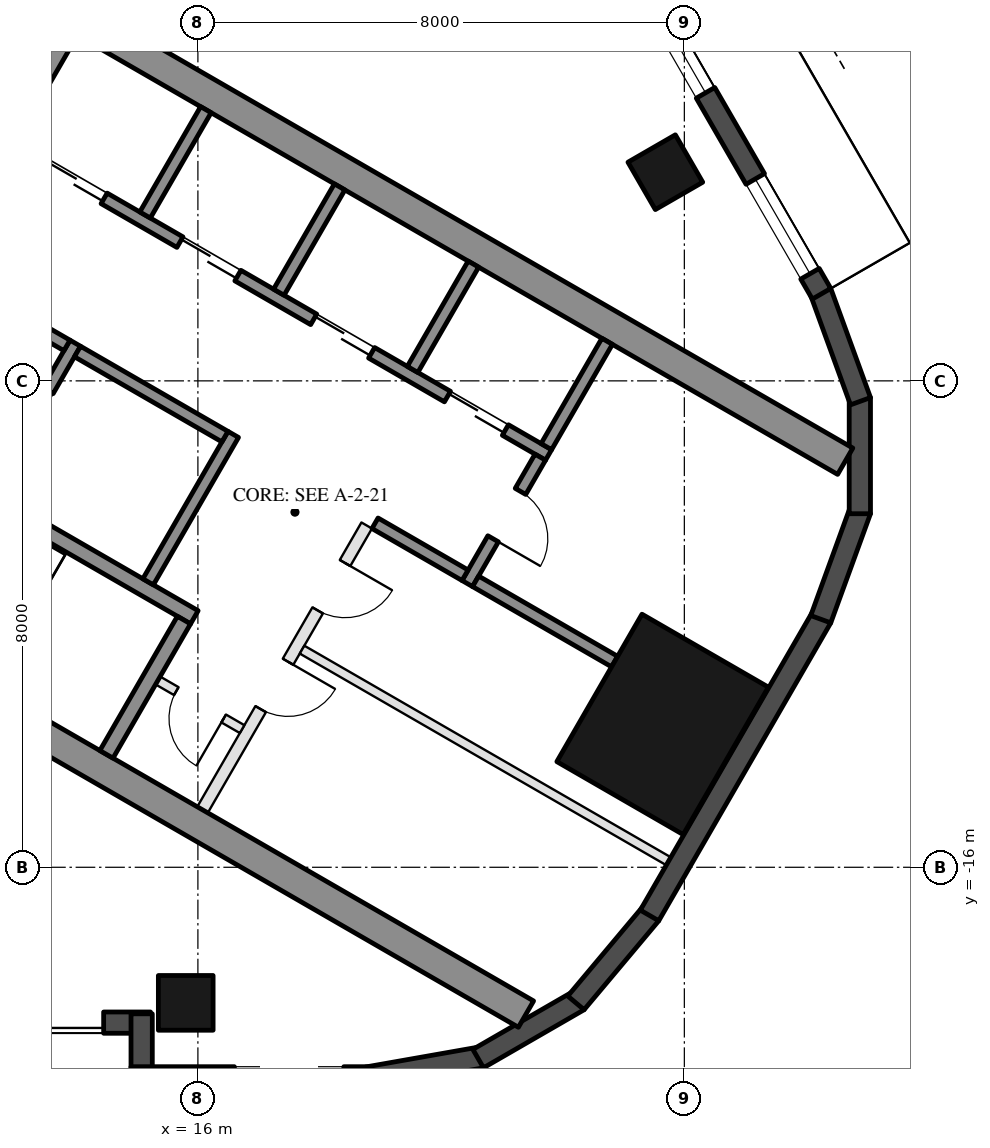
"""IFC4 building model, lengths in metres.
Left out: names, types, materials, properties, quantities, classifications, styles, units other than length and angle.
Written with IfcOpenShell. Run it as: python <this file> out.ifc"""

import sys

from ifc_helpers import new_model, si_unit, direction, frame, frame_2d, origin, origin_2d, place, context, subcontext, project, spatial, rectangle, hollow_rectangle, extrude, element, fill, save


model = new_model("IFC4")
c1 = context("Model", 3, precision=1e-05, world=origin(), true_north=direction((0.0, 1.0)))
c2 = subcontext(c1, "Body", "Model", "MODEL_VIEW")
j1 = project(units=[si_unit("LENGTHUNIT", "METRE"), si_unit("PLANEANGLEUNIT", "RADIAN")], contexts=[c1])
p1 = place(None, origin())
s1 = spatial("IfcSite", under=j1, at=p1, CompositionType="ELEMENT")
p2 = place(p1, origin())
s2 = spatial("IfcBuilding", under=s1, at=p2, CompositionType="ELEMENT")
p3 = place(p2, frame((0.0, 0.0, 98.3)))
s3 = spatial("IfcBuildingStorey", under=s2, at=p3, CompositionType="ELEMENT", Elevation=98.3)
for number, where, z_axis, x_axis in (
    (1, (15.8, -18.23, 0.0), (0.0, 0.0, 1.0), (-1.0, 0.0, 0.0)),
    (2, (23.688, -4.568, 0.0), (0.0, 0.0, 1.0), (-0.5, 0.866, 0.0)),
):
    element("IfcColumn", number, at=place(p3, frame(where, z_axis=z_axis, x_axis=x_axis)), inside=s3, PredefinedType="COLUMN", context=c2, shape_type="SweptSolid", body=[
        extrude(hollow_rectangle(XDim=0.9, YDim=0.9, WallThickness=0.04, at=origin_2d()), origin(), (0.0, 0.0, 1.0), 3.7),
    ])
p4 = place(p3, frame((23.643, -13.65, 0.0), z_axis=(0.0, 0.0, 1.0), x_axis=(0.5, 0.866025403784, 0.0)))
e3 = element("IfcColumn", 3, at=p4, inside=s3, PredefinedType="COLUMN", context=c2, shape_type="SweptSolid", body=[
    extrude(hollow_rectangle(XDim=2.8, YDim=2.4, WallThickness=0.07, at=origin_2d()), origin(), (0.0, 0.0, 1.0), 3.7),
])
p5 = place(p3, frame((8.48, -18.555, 0.0), z_axis=(0.0, 0.0, 1.0), x_axis=(1.0, 0.0, 0.0)))
e4 = element("IfcWall", 4, at=p5, inside=s3, PredefinedType="SOLIDWALL", context=c2, shape_type="SweptSolid", body=[
    extrude(rectangle(XDim=6.74, YDim=0.35, at=frame_2d((3.37, 0.0))), origin(), (0.0, 0.0, 1.0), 3.55),
])
p6 = place(p5, frame((3.57, 0.0, 0.0)))
e5 = element("IfcOpeningElement", 5, at=p6, cuts=e4, PredefinedType="OPENING", context=c2, shape_type="SweptSolid", body=[
    extrude(rectangle(XDim=2.4, YDim=2.4, at=frame_2d((1.2, 1.2))), frame((0.0, 0.185, 0.0), z_axis=(0.0, -1.0, 0.0), x_axis=(1.0, 0.0, 0.0)), (0.0, 0.0, 1.0), 0.37),
])
p7 = place(p5, frame((0.32, 0.0, 0.3)))
e6 = element("IfcOpeningElement", 6, at=p7, cuts=e4, PredefinedType="OPENING", context=c2, shape_type="SweptSolid", body=[
    extrude(rectangle(XDim=2.9, YDim=2.65, at=frame_2d((1.45, 1.325))), frame((0.0, 0.185, 0.0), z_axis=(0.0, -1.0, 0.0), x_axis=(1.0, 0.0, 0.0)), (0.0, 0.0, 1.0), 0.37),
])
p8 = place(p3, frame((15.075, -18.41, 0.0), z_axis=(0.0, 0.0, 1.0), x_axis=(0.0, -1.0, 0.0)))
e7 = element("IfcWall", 7, at=p8, inside=s3, PredefinedType="SOLIDWALL", context=c2, shape_type="SweptSolid", body=[
    extrude(rectangle(XDim=1.22, YDim=0.35, at=frame_2d((0.61, 0.0))), origin(), (0.0, 0.0, 1.0), 3.55),
])
p9 = place(p3, frame((14.9, -19.455, 0.0), z_axis=(0.0, 0.0, 1.0), x_axis=(1.0, 0.0, 0.0)))
e8 = element("IfcWall", 8, at=p9, inside=s3, PredefinedType="SOLIDWALL", context=c2, shape_type="SweptSolid", body=[
    extrude(rectangle(XDim=3.916, YDim=0.35, at=frame_2d((1.958, 0.0))), origin(), (0.0, 0.0, 1.0), 3.55),
])
p10 = place(p9, frame((1.7, 0.0, 0.3)))
e9 = element("IfcOpeningElement", 9, at=p10, cuts=e8, PredefinedType="OPENING", context=c2, shape_type="SweptSolid", body=[
    extrude(rectangle(XDim=1.8, YDim=2.65, at=frame_2d((0.9, 1.325))), frame((0.0, 0.185, 0.0), z_axis=(0.0, -1.0, 0.0), x_axis=(1.0, 0.0, 0.0)), (0.0, 0.0, 1.0), 0.37),
])
p11 = place(p3, frame((18.785, -19.458, 0.0), z_axis=(0.0, 0.0, 1.0), x_axis=(0.984798995425, 0.173697837091, 0.0)))
e10 = element("IfcWall", 10, at=p11, inside=s3, PredefinedType="SOLIDWALL", context=c2, shape_type="SweptSolid", body=[
    extrude(rectangle(XDim=1.91, YDim=0.35, at=frame_2d((0.955, 0.0))), origin(), (0.0, 0.0, 1.0), 3.55),
])
for number, where, z_axis, x_axis in (
    (11, (20.61, -19.147, 0.0), (0.0, 0.0, 1.0), (0.866, 0.5, 0.0)),
    (12, (22.217, -18.231, 0.0), (0.0, 0.0, 1.0), (0.643, 0.766, 0.0)),
):
    element("IfcWall", number, at=place(p3, frame(where, z_axis=z_axis, x_axis=x_axis)), inside=s3, PredefinedType="SOLIDWALL", context=c2, shape_type="SweptSolid", body=[
        extrude(rectangle(XDim=1.91, YDim=0.35, at=frame_2d((0.955, 0.0))), origin(), (0.0, 0.0, 1.0), 3.55),
    ])
p12 = place(p3, frame((23.427, -16.792, 0.0), z_axis=(0.0, 0.0, 1.0), x_axis=(0.500018773155, 0.866014564827, 0.0)))
e13 = element("IfcWall", 13, at=p12, inside=s3, PredefinedType="SOLIDWALL", context=c2, shape_type="SweptSolid", body=[
    extrude(rectangle(XDim=5.658, YDim=0.35, at=frame_2d((2.829, 0.0))), origin(), (0.0, 0.0, 1.0), 3.55),
])
for number, where, z_axis, x_axis in (
    (14, (26.244, -11.92, 0.0), (0.0, 0.0, 1.0), (0.342, 0.94, 0.0)),
    (15, (26.886, -10.185, 0.0), (0.0, 0.0, 1.0), (0.0, 1.0, 0.0)),
    (16, (26.897, -8.335, 0.0), (0.0, 0.0, 1.0), (-0.342, 0.94, 0.0)),
):
    element("IfcWall", number, at=place(p3, frame(where, z_axis=z_axis, x_axis=x_axis)), inside=s3, PredefinedType="SOLIDWALL", context=c2, shape_type="SweptSolid", body=[
        extrude(rectangle(XDim=1.91, YDim=0.35, at=frame_2d((0.955, 0.0))), origin(), (0.0, 0.0, 1.0), 3.55),
    ])
p13 = place(p3, frame((26.257, -6.567, 0.0), z_axis=(0.0, 0.0, 1.0), x_axis=(-0.500023526245, 0.866011820475, 0.0)))
e17 = element("IfcWall", 17, at=p13, inside=s3, PredefinedType="SOLIDWALL", context=c2, shape_type="SweptSolid", body=[
    extrude(rectangle(XDim=11.816, YDim=0.35, at=frame_2d((5.908, 0.0))), origin(), (0.0, 0.0, 1.0), 3.55),
])
p14 = place(p13, frame((0.38, 0.0, 0.3)))
e18 = element("IfcOpeningElement", 18, at=p14, cuts=e17, PredefinedType="OPENING", context=c2, shape_type="SweptSolid", body=[
    extrude(rectangle(XDim=1.8, YDim=2.65, at=frame_2d((0.9, 1.325))), frame((0.0, 0.185, 0.0), z_axis=(0.0, -1.0, 0.0), x_axis=(1.0, 0.0, 0.0)), (0.0, 0.0, 1.0), 0.37),
])
p15 = place(p13, frame((7.716, 0.0, 0.0)))
e19 = element("IfcOpeningElement", 19, at=p15, cuts=e17, PredefinedType="OPENING", context=c2, shape_type="SweptSolid", body=[
    extrude(rectangle(XDim=2.4, YDim=2.4, at=frame_2d((1.2, 1.2))), frame((0.0, 0.185, 0.0), z_axis=(0.0, -1.0, 0.0), x_axis=(1.0, 0.0, 0.0)), (0.0, 0.0, 1.0), 0.37),
])
p16 = place(p13, frame((3.816, 0.0, 0.3)))
e20 = element("IfcOpeningElement", 20, at=p16, cuts=e17, PredefinedType="OPENING", context=c2, shape_type="SweptSolid", body=[
    extrude(rectangle(XDim=1.6, YDim=2.65, at=frame_2d((0.8, 1.325))), frame((0.0, 0.185, 0.0), z_axis=(0.0, -1.0, 0.0), x_axis=(1.0, 0.0, 0.0)), (0.0, 0.0, 1.0), 0.37),
])
p17 = place(p13, frame((5.716, 0.0, 0.3)))
e21 = element("IfcOpeningElement", 21, at=p17, cuts=e17, PredefinedType="OPENING", context=c2, shape_type="SweptSolid", body=[
    extrude(rectangle(XDim=1.6, YDim=2.65, at=frame_2d((0.8, 1.325))), frame((0.0, 0.185, 0.0), z_axis=(0.0, -1.0, 0.0), x_axis=(1.0, 0.0, 0.0)), (0.0, 0.0, 1.0), 0.37),
])
for number, where, z_axis, x_axis in (
    (22, (8.547, -10.997, 0.0), (0.0, 0.0, 1.0), (0.866, -0.5, 0.0)),
    (23, (13.797, -1.903, 0.0), (0.0, 0.0, 1.0), (0.866, -0.5, 0.0)),
):
    element("IfcWall", number, at=place(p3, frame(where, z_axis=z_axis, x_axis=x_axis)), inside=s3, PredefinedType="SHEAR", context=c2, shape_type="SweptSolid", body=[
        extrude(rectangle(XDim=14.837, YDim=0.5, at=frame_2d((7.418, 0.0))), origin(), (0.0, 0.0, 1.0), 3.5),
    ])
p18 = place(p3, frame((8.845, -10.88, 0.0), z_axis=(0.0, 0.0, 1.0), x_axis=(0.500004234368, 0.866022959057, 0.0)))
e24 = element("IfcWall", 24, at=p18, inside=s3, PredefinedType="SHEAR", context=c2, shape_type="SweptSolid", body=[
    extrude(rectangle(XDim=10.0, YDim=0.4, at=frame_2d((5.0, 0.0))), origin(), (0.0, 0.0, 1.0), 3.5),
])
p19 = place(p18, frame((3.55, 0.0, 0.0)))
e25 = element("IfcOpeningElement", 25, at=p19, cuts=e24, PredefinedType="OPENING", context=c2, shape_type="SweptSolid", body=[
    extrude(rectangle(XDim=1.1, YDim=2.1, at=frame_2d((0.55, 1.05))), frame((0.0, 0.21, 0.0), z_axis=(0.0, -1.0, 0.0), x_axis=(1.0, 0.0, 0.0)), (0.0, 0.0, 1.0), 0.42),
])
p20 = place(p18, frame((5.85, 0.0, 0.0)))
e26 = element("IfcOpeningElement", 26, at=p20, cuts=e24, PredefinedType="OPENING", context=c2, shape_type="SweptSolid", body=[
    extrude(rectangle(XDim=1.4, YDim=2.1, at=frame_2d((0.7, 1.05))), frame((0.0, 0.21, 0.0), z_axis=(0.0, -1.0, 0.0), x_axis=(1.0, 0.0, 0.0)), (0.0, 0.0, 1.0), 0.42),
])
p21 = place(p3, frame((10.356, -8.664, 0.0), z_axis=(0.0, 0.0, 1.0), x_axis=(0.866028629588, -0.499994412703, 0.0)))
e27 = element("IfcWall", 27, at=p21, inside=s3, PredefinedType="SHEAR", context=c2, shape_type="SweptSolid", body=[
    extrude(rectangle(XDim=6.45, YDim=0.25, at=frame_2d((3.225, 0.0))), origin(), (0.0, 0.0, 1.0), 3.5),
])
p22 = place(p21, frame((0.3, 0.0, 0.0)))
e28 = element("IfcOpeningElement", 28, at=p22, cuts=e27, PredefinedType="OPENING", context=c2, shape_type="SweptSolid", body=[
    extrude(rectangle(XDim=1.0, YDim=2.1, at=frame_2d((0.5, 1.05))), frame((0.0, 0.135, 0.0), z_axis=(0.0, -1.0, 0.0), x_axis=(1.0, 0.0, 0.0)), (0.0, 0.0, 1.0), 0.27),
])
p23 = place(p3, frame((14.496, -14.143, 0.0), z_axis=(0.0, 0.0, 1.0), x_axis=(0.500062241894, 0.865989465428, 0.0)))
e29 = element("IfcWall", 29, at=p23, inside=s3, PredefinedType="SHEAR", context=c2, shape_type="SweptSolid", body=[
    extrude(rectangle(XDim=2.55, YDim=0.25, at=frame_2d((1.275, 0.0))), origin(), (0.0, 0.0, 1.0), 3.5),
])
p24 = place(p3, frame((15.181, -11.305, 0.0), z_axis=(0.0, 0.0, 1.0), x_axis=(0.49994636267, 0.866056369097, 0.0)))
e30 = element("IfcWall", 30, at=p24, inside=s3, PredefinedType="SHEAR", context=c2, shape_type="SweptSolid", body=[
    extrude(rectangle(XDim=2.8, YDim=0.2, at=frame_2d((1.4, 0.0))), origin(), (0.0, 0.0, 1.0), 3.5),
])
p25 = place(p3, frame((12.583, -9.805, 0.0), z_axis=(0.0, 0.0, 1.0), x_axis=(0.49994636267, 0.866056369097, 0.0)))
e31 = element("IfcWall", 31, at=p25, inside=s3, PredefinedType="SHEAR", context=c2, shape_type="SweptSolid", body=[
    extrude(rectangle(XDim=2.8, YDim=0.2, at=frame_2d((1.4, 0.0))), origin(), (0.0, 0.0, 1.0), 3.5),
])
p26 = place(p25, frame((0.7, 0.0, 0.0)))
e32 = element("IfcOpeningElement", 32, at=p26, cuts=e31, PredefinedType="OPENING", context=c2, shape_type="SweptSolid", body=[
    extrude(rectangle(XDim=1.2, YDim=2.1, at=frame_2d((0.6, 1.05))), frame((0.0, 0.11, 0.0), z_axis=(0.0, -1.0, 0.0), x_axis=(1.0, 0.0, 0.0)), (0.0, 0.0, 1.0), 0.22),
])
p27 = place(p3, frame((11.768, -6.217, 0.0), z_axis=(0.0, 0.0, 1.0), x_axis=(0.866050077142, -0.499957262057, 0.0)))
e33 = element("IfcWall", 33, at=p27, inside=s3, PredefinedType="SHEAR", context=c2, shape_type="SweptSolid", body=[
    extrude(rectangle(XDim=2.4, YDim=0.2, at=frame_2d((1.2, 0.0))), origin(), (0.0, 0.0, 1.0), 3.5),
])
p28 = place(p3, frame((14.02, -7.517, 0.0), z_axis=(0.0, 0.0, 1.0), x_axis=(0.866034573852, -0.49998411664, 0.0)))
e34 = element("IfcWall", 34, at=p28, inside=s3, PredefinedType="SHEAR", context=c2, shape_type="SweptSolid", body=[
    extrude(rectangle(XDim=2.8, YDim=0.2, at=frame_2d((1.4, 0.0))), origin(), (0.0, 0.0, 1.0), 3.5),
])
p29 = place(p3, frame((12.968, -4.138, 0.0), z_axis=(0.0, 0.0, 1.0), x_axis=(0.866028328073, -0.49999493495, 0.0)))
e35 = element("IfcWall", 35, at=p29, inside=s3, PredefinedType="SHEAR", context=c2, shape_type="SweptSolid", body=[
    extrude(rectangle(XDim=10.16, YDim=0.2, at=frame_2d((5.08, 0.0))), origin(), (0.0, 0.0, 1.0), 3.5),
])
p30 = place(p29, frame((0.62, 0.0, 0.0)))
e36 = element("IfcOpeningElement", 36, at=p30, cuts=e35, PredefinedType="OPENING", context=c2, shape_type="SweptSolid", body=[
    extrude(rectangle(XDim=1.1, YDim=2.1, at=frame_2d((0.55, 1.05))), frame((0.0, 0.11, 0.0), z_axis=(0.0, -1.0, 0.0), x_axis=(1.0, 0.0, 0.0)), (0.0, 0.0, 1.0), 0.22),
])
p31 = place(p29, frame((3.16, 0.0, 0.0)))
e37 = element("IfcOpeningElement", 37, at=p31, cuts=e35, PredefinedType="OPENING", context=c2, shape_type="SweptSolid", body=[
    extrude(rectangle(XDim=1.1, YDim=2.1, at=frame_2d((0.55, 1.05))), frame((0.0, 0.11, 0.0), z_axis=(0.0, -1.0, 0.0), x_axis=(1.0, 0.0, 0.0)), (0.0, 0.0, 1.0), 0.22),
])
p32 = place(p29, frame((5.7, 0.0, 0.0)))
e38 = element("IfcOpeningElement", 38, at=p32, cuts=e35, PredefinedType="OPENING", context=c2, shape_type="SweptSolid", body=[
    extrude(rectangle(XDim=1.1, YDim=2.1, at=frame_2d((0.55, 1.05))), frame((0.0, 0.11, 0.0), z_axis=(0.0, -1.0, 0.0), x_axis=(1.0, 0.0, 0.0)), (0.0, 0.0, 1.0), 0.22),
])
p33 = place(p29, frame((8.24, 0.0, 0.0)))
e39 = element("IfcOpeningElement", 39, at=p33, cuts=e35, PredefinedType="OPENING", context=c2, shape_type="SweptSolid", body=[
    extrude(rectangle(XDim=1.1, YDim=2.1, at=frame_2d((0.55, 1.05))), frame((0.0, 0.11, 0.0), z_axis=(0.0, -1.0, 0.0), x_axis=(1.0, 0.0, 0.0)), (0.0, 0.0, 1.0), 0.22),
])
p34 = place(p3, frame((20.43, -11.333, 0.0), z_axis=(0.0, 0.0, 1.0), x_axis=(0.500001309137, 0.866024647952, 0.0)))
e40 = element("IfcWall", 40, at=p34, inside=s3, PredefinedType="SHEAR", context=c2, shape_type="SweptSolid", body=[
    extrude(rectangle(XDim=2.4, YDim=0.2, at=frame_2d((1.2, 0.0))), origin(), (0.0, 0.0, 1.0), 3.5),
])
p35 = place(p34, frame((0.85, 0.0, 0.0)))
e41 = element("IfcOpeningElement", 41, at=p35, cuts=e40, PredefinedType="OPENING", context=c2, shape_type="SweptSolid", body=[
    extrude(rectangle(XDim=0.9, YDim=2.1, at=frame_2d((0.45, 1.05))), frame((0.0, 0.11, 0.0), z_axis=(0.0, -1.0, 0.0), x_axis=(1.0, 0.0, 0.0)), (0.0, 0.0, 1.0), 0.22),
])
p36 = place(p3, frame((18.913, -10.342, 0.0), z_axis=(0.0, 0.0, 1.0), x_axis=(0.866038183914, -0.499977863513, 0.0)))
e42 = element("IfcWall", 42, at=p36, inside=s3, PredefinedType="SHEAR", context=c2, shape_type="SweptSolid", body=[
    extrude(rectangle(XDim=1.71, YDim=0.2, at=frame_2d((0.855, 0.0))), origin(), (0.0, 0.0, 1.0), 3.5),
])
for number, where, z_axis, x_axis in (
    (43, (15.131, -5.272, 0.0), (0.0, 0.0, 1.0), (0.5, 0.866, 0.0)),
    (44, (17.331, -6.542, 0.0), (0.0, 0.0, 1.0), (0.5, 0.866, 0.0)),
    (45, (19.531, -7.812, 0.0), (0.0, 0.0, 1.0), (0.5, 0.866, 0.0)),
    (46, (21.73, -9.082, 0.0), (0.0, 0.0, 1.0), (0.5, 0.866, 0.0)),
):
    element("IfcWall", number, at=place(p3, frame(where, z_axis=z_axis, x_axis=x_axis)), inside=s3, PredefinedType="SHEAR", context=c2, shape_type="SweptSolid", body=[
        extrude(rectangle(XDim=2.0, YDim=0.2, at=frame_2d((1.0, 0.0))), origin(), (0.0, 0.0, 1.0), 3.5),
    ])
p37 = place(p3, frame((20.567, -11.297, 0.0), z_axis=(0.0, 0.0, 1.0), x_axis=(0.866060851709, -0.499938597367, 0.0)))
e47 = element("IfcWall", 47, at=p37, inside=s3, PredefinedType="SHEAR", context=c2, shape_type="SweptSolid", body=[
    extrude(rectangle(XDim=2.64, YDim=0.2, at=frame_2d((1.32, 0.0))), origin(), (0.0, 0.0, 1.0), 3.5),
])
p38 = place(p3, frame((16.076, -15.055, 0.0), z_axis=(0.0, 0.0, 1.0), x_axis=(0.499995103361, 0.866028230842, 0.0)))
e48 = element("IfcWall", 48, at=p38, inside=s3, PredefinedType="PARTITIONING", context=c2, shape_type="SweptSolid", body=[
    extrude(rectangle(XDim=5.4, YDim=0.2, at=frame_2d((2.7, 0.0))), origin(), (0.0, 0.0, 1.0), 3.5),
])
p39 = place(p38, frame((1.913, 0.0, 0.0)))
e49 = element("IfcOpeningElement", 49, at=p39, cuts=e48, PredefinedType="OPENING", context=c2, shape_type="SweptSolid", body=[
    extrude(rectangle(XDim=0.9, YDim=2.1, at=frame_2d((0.45, 1.05))), frame((0.0, 0.11, 0.0), z_axis=(0.0, -1.0, 0.0), x_axis=(1.0, 0.0, 0.0)), (0.0, 0.0, 1.0), 0.22),
])
p40 = place(p38, frame((3.788, 0.0, 0.0)))
e50 = element("IfcOpeningElement", 50, at=p40, cuts=e48, PredefinedType="OPENING", context=c2, shape_type="SweptSolid", body=[
    extrude(rectangle(XDim=0.9, YDim=2.1, at=frame_2d((0.45, 1.05))), frame((0.0, 0.11, 0.0), z_axis=(0.0, -1.0, 0.0), x_axis=(1.0, 0.0, 0.0)), (0.0, 0.0, 1.0), 0.22),
])
p41 = place(p3, frame((15.342, -12.928, 0.0), z_axis=(0.0, 0.0, 1.0), x_axis=(0.865989903783, -0.500061482766, 0.0)))
e51 = element("IfcWall", 51, at=p41, inside=s3, PredefinedType="PARTITIONING", context=c2, shape_type="SweptSolid", body=[
    extrude(rectangle(XDim=1.6, YDim=0.15, at=frame_2d((0.8, 0.0))), origin(), (0.0, 0.0, 1.0), 3.5),
])
p42 = place(p41, frame((0.35, 0.0, 0.0)))
e52 = element("IfcOpeningElement", 52, at=p42, cuts=e51, PredefinedType="OPENING", context=c2, shape_type="SweptSolid", body=[
    extrude(rectangle(XDim=0.9, YDim=2.1, at=frame_2d((0.45, 1.05))), frame((0.0, 0.085, 0.0), z_axis=(0.0, -1.0, 0.0), x_axis=(1.0, 0.0, 0.0)), (0.0, 0.0, 1.0), 0.17),
])
p43 = place(p3, frame((17.713, -12.42, 0.0), z_axis=(0.0, 0.0, 1.0), x_axis=(0.866016523273, -0.500015381182, 0.0)))
e53 = element("IfcWall", 53, at=p43, inside=s3, PredefinedType="PARTITIONING", context=c2, shape_type="SweptSolid", body=[
    extrude(rectangle(XDim=6.95, YDim=0.15, at=frame_2d((3.475, 0.0))), origin(), (0.0, 0.0, 1.0), 3.5),
])
p44 = place(p6, frame((2.4, 0.0, 0.0), z_axis=(0.0, 0.0, 1.0), x_axis=(-1.0, 0.0, 0.0)))
e54 = element("IfcDoor", 54, at=p44, inside=s3, OperationType="SLIDING_TO_LEFT", PredefinedType="DOOR", context=c2, shape_type="SweptSolid", body=[
    extrude(rectangle(XDim=2.4, YDim=2.4, at=frame_2d((1.2, 1.2))), frame((0.0, 0.025, 0.0), z_axis=(0.0, -1.0, 0.0), x_axis=(1.0, 0.0, 0.0)), (0.0, 0.0, 1.0), 0.05),
])
fill(e5, e54)
p45 = place(p14, origin())
e55 = element("IfcWindow", 55, at=p45, inside=s3, PartitioningType="SINGLE_PANEL", PredefinedType="WINDOW", context=c2, shape_type="SweptSolid", body=[
    extrude(rectangle(XDim=1.8, YDim=2.65, at=frame_2d((0.9, 1.325))), frame((0.0, 0.03, 0.0), z_axis=(0.0, -1.0, 0.0), x_axis=(1.0, 0.0, 0.0)), (0.0, 0.0, 1.0), 0.06),
])
fill(e18, e55)
p46 = place(p16, origin())
e56 = element("IfcWindow", 56, at=p46, inside=s3, PartitioningType="SINGLE_PANEL", PredefinedType="WINDOW", context=c2, shape_type="SweptSolid", body=[
    extrude(rectangle(XDim=1.6, YDim=2.65, at=frame_2d((0.8, 1.325))), frame((0.0, 0.03, 0.0), z_axis=(0.0, -1.0, 0.0), x_axis=(1.0, 0.0, 0.0)), (0.0, 0.0, 1.0), 0.06),
])
fill(e20, e56)
p47 = place(p42, frame((0.9, 0.0, 0.0), z_axis=(0.0, 0.0, 1.0), x_axis=(-1.0, 0.0, 0.0)))
e57 = element("IfcDoor", 57, at=p47, inside=s3, OperationType="SINGLE_SWING_LEFT", PredefinedType="DOOR", context=c2, shape_type="SweptSolid", body=[
    extrude(rectangle(XDim=0.9, YDim=2.1, at=frame_2d((0.45, 1.05))), frame((0.0, 0.025, 0.0), z_axis=(0.0, -1.0, 0.0), x_axis=(1.0, 0.0, 0.0)), (0.0, 0.0, 1.0), 0.05),
])
fill(e52, e57)
p48 = place(p30, origin())
e58 = element("IfcDoor", 58, at=p48, inside=s3, OperationType="DOUBLE_DOOR_SLIDING", PredefinedType="DOOR", context=c2, shape_type="SweptSolid", body=[
    extrude(rectangle(XDim=1.1, YDim=2.1, at=frame_2d((0.55, 1.05))), frame((0.0, 0.025, 0.0), z_axis=(0.0, -1.0, 0.0), x_axis=(1.0, 0.0, 0.0)), (0.0, 0.0, 1.0), 0.05),
])
fill(e36, e58)
p49 = place(p31, origin())
e59 = element("IfcDoor", 59, at=p49, inside=s3, OperationType="DOUBLE_DOOR_SLIDING", PredefinedType="DOOR", context=c2, shape_type="SweptSolid", body=[
    extrude(rectangle(XDim=1.1, YDim=2.1, at=frame_2d((0.55, 1.05))), frame((0.0, 0.025, 0.0), z_axis=(0.0, -1.0, 0.0), x_axis=(1.0, 0.0, 0.0)), (0.0, 0.0, 1.0), 0.05),
])
fill(e37, e59)
p50 = place(p32, origin())
e60 = element("IfcDoor", 60, at=p50, inside=s3, OperationType="DOUBLE_DOOR_SLIDING", PredefinedType="DOOR", context=c2, shape_type="SweptSolid", body=[
    extrude(rectangle(XDim=1.1, YDim=2.1, at=frame_2d((0.55, 1.05))), frame((0.0, 0.025, 0.0), z_axis=(0.0, -1.0, 0.0), x_axis=(1.0, 0.0, 0.0)), (0.0, 0.0, 1.0), 0.05),
])
fill(e38, e60)
p51 = place(p33, origin())
e61 = element("IfcDoor", 61, at=p51, inside=s3, OperationType="DOUBLE_DOOR_SLIDING", PredefinedType="DOOR", context=c2, shape_type="SweptSolid", body=[
    extrude(rectangle(XDim=1.1, YDim=2.1, at=frame_2d((0.55, 1.05))), frame((0.0, 0.025, 0.0), z_axis=(0.0, -1.0, 0.0), x_axis=(1.0, 0.0, 0.0)), (0.0, 0.0, 1.0), 0.05),
])
fill(e39, e61)
p52 = place(p35, frame((0.9, 0.0, 0.0), z_axis=(0.0, 0.0, 1.0), x_axis=(-1.0, 0.0, 0.0)))
e62 = element("IfcDoor", 62, at=p52, inside=s3, OperationType="SINGLE_SWING_RIGHT", PredefinedType="DOOR", context=c2, shape_type="SweptSolid", body=[
    extrude(rectangle(XDim=0.9, YDim=2.1, at=frame_2d((0.45, 1.05))), frame((0.0, 0.025, 0.0), z_axis=(0.0, -1.0, 0.0), x_axis=(1.0, 0.0, 0.0)), (0.0, 0.0, 1.0), 0.05),
])
fill(e41, e62)
p53 = place(p39, frame((0.9, 0.0, 0.0), z_axis=(0.0, 0.0, 1.0), x_axis=(-1.0, 0.0, 0.0)))
e63 = element("IfcDoor", 63, at=p53, inside=s3, OperationType="SINGLE_SWING_LEFT", PredefinedType="DOOR", context=c2, shape_type="SweptSolid", body=[
    extrude(rectangle(XDim=0.9, YDim=2.1, at=frame_2d((0.45, 1.05))), frame((0.0, 0.025, 0.0), z_axis=(0.0, -1.0, 0.0), x_axis=(1.0, 0.0, 0.0)), (0.0, 0.0, 1.0), 0.05),
])
fill(e49, e63)
p54 = place(p40, frame((0.9, 0.0, 0.0), z_axis=(0.0, 0.0, 1.0), x_axis=(-1.0, 0.0, 0.0)))
e64 = element("IfcDoor", 64, at=p54, inside=s3, OperationType="SINGLE_SWING_LEFT", PredefinedType="DOOR", context=c2, shape_type="SweptSolid", body=[
    extrude(rectangle(XDim=0.9, YDim=2.1, at=frame_2d((0.45, 1.05))), frame((0.0, 0.025, 0.0), z_axis=(0.0, -1.0, 0.0), x_axis=(1.0, 0.0, 0.0)), (0.0, 0.0, 1.0), 0.05),
])
fill(e50, e64)
save(model, sys.argv[1])
